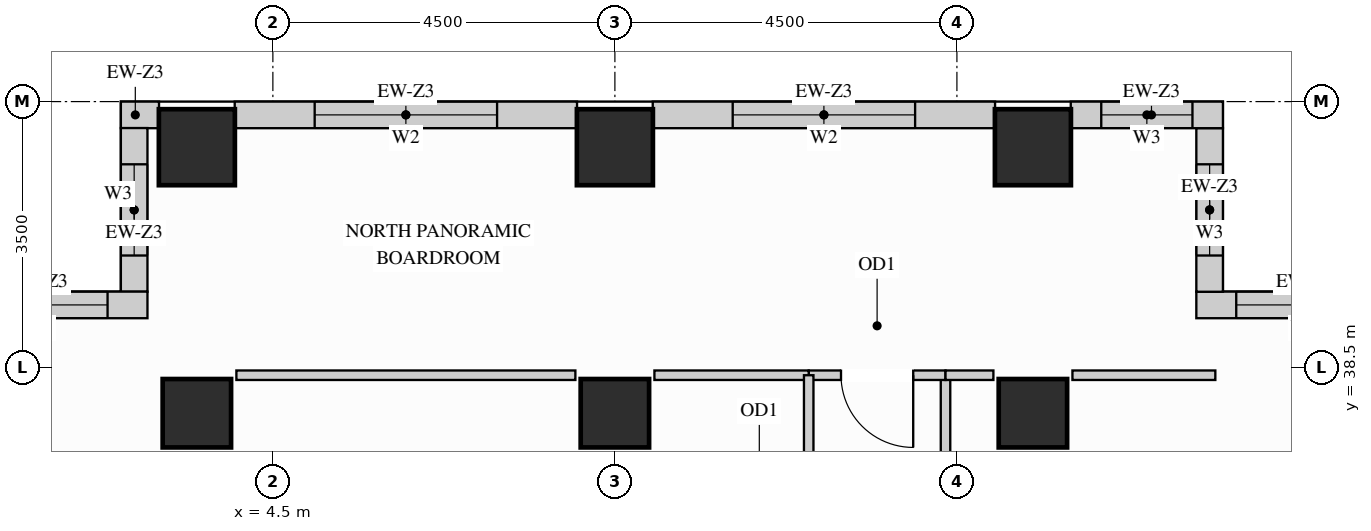
"""IFC4 building model, lengths in metres.
Left out: names, types, materials, properties, quantities, classifications, styles, units other than length and angle.
Written with IfcOpenShell. Run it as: python <this file> out.ifc"""

import sys

from ifc_helpers import new_model, si_unit, direction, frame, frame_2d, origin, origin_2d, place, context, subcontext, project, spatial, rectangle, extrude, source, transform, mapped, element, fill, save


model = new_model("IFC4")
c1 = context("Model", 3, precision=1e-05, world=origin(), true_north=direction((0.0, 1.0)))
c2 = subcontext(c1, "Body", "Model", "MODEL_VIEW")
j1 = project(units=[si_unit("LENGTHUNIT", "METRE"), si_unit("PLANEANGLEUNIT", "RADIAN")], contexts=[c1])
p1 = place(None, origin())
s1 = spatial("IfcSite", under=j1, at=p1, CompositionType="ELEMENT")
p2 = place(p1, origin())
s2 = spatial("IfcBuilding", under=s1, at=p2, CompositionType="ELEMENT")
p3 = place(p2, frame((0.0, 0.0, 171.9)))
s3 = spatial("IfcBuildingStorey", under=s2, at=p3, CompositionType="ELEMENT", Elevation=171.9)
m1 = source(origin(), c2, "Body", "SweptSolid", [
    extrude(rectangle(XDim=0.9, YDim=0.9, at=origin_2d()), origin(), (0.0, 0.0, 1.0), 3.4),
])
for number, where, z_axis, x_axis in (
    (1, (14.5, 37.9, 0.0), (0.0, 0.0, 1.0), (1.0, 0.0, 0.0)),
    (2, (3.5, 37.9, 0.0), (0.0, 0.0, 1.0), (1.0, 0.0, 0.0)),
    (3, (9.0, 37.9, 0.0), (0.0, 0.0, 1.0), (1.0, 0.0, 0.0)),
):
    element("IfcColumn", number, at=place(p3, frame(where, z_axis=z_axis, x_axis=x_axis)), inside=s3, PredefinedType="COLUMN", context=c2, shape_type="MappedRepresentation", body=[
        mapped(m1, transform((0.0, 0.0, 0.0), x_axis=(1.0, 0.0, 0.0), y_axis=(0.0, 1.0, 0.0), z_axis=(0.0, 0.0, 1.0))),
    ])
m2 = source(origin(), c2, "Body", "SweptSolid", [
    extrude(rectangle(XDim=1.0, YDim=1.0, at=origin_2d()), origin(), (0.0, 0.0, 1.0), 3.4),
])
for number, where, z_axis, x_axis in (
    (4, (14.5, 41.4, 0.0), (0.0, 0.0, 1.0), (1.0, 0.0, 0.0)),
    (5, (3.5, 41.4, 0.0), (0.0, 0.0, 1.0), (1.0, 0.0, 0.0)),
    (6, (9.0, 41.4, 0.0), (0.0, 0.0, 1.0), (1.0, 0.0, 0.0)),
):
    element("IfcColumn", number, at=place(p3, frame(where, z_axis=z_axis, x_axis=x_axis)), inside=s3, PredefinedType="COLUMN", context=c2, shape_type="MappedRepresentation", body=[
        mapped(m2, transform((0.0, 0.0, 0.0), x_axis=(1.0, 0.0, 0.0), y_axis=(0.0, 1.0, 0.0), z_axis=(0.0, 0.0, 1.0))),
    ])
p4 = place(p3, frame((19.5, 39.325, 0.0), z_axis=(0.0, 0.0, 1.0), x_axis=(-1.0, 0.0, 0.0)))
e7 = element("IfcWall", 7, at=p4, inside=s3, PredefinedType="SOLIDWALL", context=c2, shape_type="SweptSolid", body=[
    extrude(rectangle(XDim=2.85, YDim=0.35, at=frame_2d((1.425, 0.0))), origin(), (0.0, 0.0, 1.0), 3.385),
])
p5 = place(p4, frame((0.525, 0.0, 0.78)))
e8 = element("IfcOpeningElement", 8, at=p5, cuts=e7, PredefinedType="OPENING", context=c2, shape_type="SweptSolid", body=[
    extrude(rectangle(XDim=1.8, YDim=2.1, at=frame_2d((0.9, 1.05))), frame((0.0, 0.185, 0.0), z_axis=(0.0, -1.0, 0.0), x_axis=(1.0, 0.0, 0.0)), (0.0, 0.0, 1.0), 0.37),
])
p6 = place(p3, frame((16.825, 39.498, 0.0), z_axis=(0.0, 0.0, 1.0), x_axis=(0.0, 1.0, 0.0)))
e9 = element("IfcWall", 9, at=p6, inside=s3, PredefinedType="SOLIDWALL", context=c2, shape_type="SweptSolid", body=[
    extrude(rectangle(XDim=2.154, YDim=0.35, at=frame_2d((1.077, 0.0))), origin(), (0.0, 0.0, 1.0), 3.385),
])
p7 = place(p6, frame((0.477, 0.0, 0.78)))
e10 = element("IfcOpeningElement", 10, at=p7, cuts=e9, PredefinedType="OPENING", context=c2, shape_type="SweptSolid", body=[
    extrude(rectangle(XDim=1.2, YDim=2.1, at=frame_2d((0.6, 1.05))), frame((0.0, 0.185, 0.0), z_axis=(0.0, -1.0, 0.0), x_axis=(1.0, 0.0, 0.0)), (0.0, 0.0, 1.0), 0.37),
])
p8 = place(p3, frame((17.0, 41.825, 0.0), z_axis=(0.0, 0.0, 1.0), x_axis=(-1.0, 0.0, 0.0)))
e11 = element("IfcWall", 11, at=p8, inside=s3, PredefinedType="SOLIDWALL", context=c2, shape_type="SweptSolid", body=[
    extrude(rectangle(XDim=2.002, YDim=0.35, at=frame_2d((1.001, 0.0))), origin(), (0.0, 0.0, 1.0), 3.385),
])
p9 = place(p8, frame((0.401, 0.0, 0.78)))
e12 = element("IfcOpeningElement", 12, at=p9, cuts=e11, PredefinedType="OPENING", context=c2, shape_type="SweptSolid", body=[
    extrude(rectangle(XDim=1.2, YDim=2.1, at=frame_2d((0.6, 1.05))), frame((0.0, 0.185, 0.0), z_axis=(0.0, -1.0, 0.0), x_axis=(1.0, 0.0, 0.0)), (0.0, 0.0, 1.0), 0.37),
])
p10 = place(p3, frame((14.002, 41.825, 0.0), z_axis=(0.0, 0.0, 1.0), x_axis=(-1.0, 0.0, 0.0)))
e13 = element("IfcWall", 13, at=p10, inside=s3, PredefinedType="SOLIDWALL", context=c2, shape_type="SweptSolid", body=[
    extrude(rectangle(XDim=4.504, YDim=0.35, at=frame_2d((2.252, 0.0))), origin(), (0.0, 0.0, 1.0), 2.612),
])
p11 = place(p10, frame((1.052, 0.0, 0.78)))
e14 = element("IfcOpeningElement", 14, at=p11, cuts=e13, PredefinedType="OPENING", context=c2, shape_type="SweptSolid", body=[
    extrude(rectangle(XDim=2.4, YDim=1.652, at=frame_2d((1.2, 0.826))), frame((0.0, 0.185, 0.0), z_axis=(0.0, -1.0, 0.0), x_axis=(1.0, 0.0, 0.0)), (0.0, 0.0, 1.0), 0.37),
])
p12 = place(p3, frame((8.502, 41.825, 0.0), z_axis=(0.0, 0.0, 1.0), x_axis=(-1.0, 0.0, 0.0)))
e15 = element("IfcWall", 15, at=p12, inside=s3, PredefinedType="SOLIDWALL", context=c2, shape_type="SweptSolid", body=[
    extrude(rectangle(XDim=4.504, YDim=0.35, at=frame_2d((2.252, 0.0))), origin(), (0.0, 0.0, 1.0), 2.612),
])
p13 = place(p12, frame((1.052, 0.0, 0.78)))
e16 = element("IfcOpeningElement", 16, at=p13, cuts=e15, PredefinedType="OPENING", context=c2, shape_type="SweptSolid", body=[
    extrude(rectangle(XDim=2.4, YDim=1.652, at=frame_2d((1.2, 0.826))), frame((0.0, 0.185, 0.0), z_axis=(0.0, -1.0, 0.0), x_axis=(1.0, 0.0, 0.0)), (0.0, 0.0, 1.0), 0.37),
])
m3 = source(origin(), c2, "Body", "SweptSolid", [
    extrude(rectangle(XDim=0.502, YDim=0.35, at=frame_2d((0.251, 0.0))), origin(), (0.0, 0.0, 1.0), 3.385),
])
p14 = place(p3, frame((3.002, 41.825, 0.0), z_axis=(0.0, 0.0, 1.0), x_axis=(-1.0, 0.0, 0.0)))
e17 = element("IfcWall", 17, at=p14, inside=s3, PredefinedType="SOLIDWALL", context=c2, shape_type="MappedRepresentation", body=[
    mapped(m3, transform((0.0, 0.0, 0.0), x_axis=(1.0, 0.0, 0.0), y_axis=(0.0, 1.0, 0.0), z_axis=(0.0, 0.0, 1.0))),
])
p15 = place(p3, frame((2.675, 41.652, 0.0), z_axis=(0.0, 0.0, 1.0), x_axis=(0.0, -1.0, 0.0)))
e18 = element("IfcWall", 18, at=p15, inside=s3, PredefinedType="SOLIDWALL", context=c2, shape_type="SweptSolid", body=[
    extrude(rectangle(XDim=2.154, YDim=0.35, at=frame_2d((1.077, 0.0))), origin(), (0.0, 0.0, 1.0), 3.385),
])
p16 = place(p15, frame((0.477, 0.0, 0.78)))
e19 = element("IfcOpeningElement", 19, at=p16, cuts=e18, PredefinedType="OPENING", context=c2, shape_type="SweptSolid", body=[
    extrude(rectangle(XDim=1.2, YDim=2.1, at=frame_2d((0.6, 1.05))), frame((0.0, 0.185, 0.0), z_axis=(0.0, -1.0, 0.0), x_axis=(1.0, 0.0, 0.0)), (0.0, 0.0, 1.0), 0.37),
])
p17 = place(p3, frame((2.85, 39.325, 0.0), z_axis=(0.0, 0.0, 1.0), x_axis=(-1.0, 0.0, 0.0)))
e20 = element("IfcWall", 20, at=p17, inside=s3, PredefinedType="SOLIDWALL", context=c2, shape_type="SweptSolid", body=[
    extrude(rectangle(XDim=2.85, YDim=0.35, at=frame_2d((1.425, 0.0))), origin(), (0.0, 0.0, 1.0), 3.385),
])
p18 = place(p17, frame((0.525, 0.0, 0.78)))
e21 = element("IfcOpeningElement", 21, at=p18, cuts=e20, PredefinedType="OPENING", context=c2, shape_type="SweptSolid", body=[
    extrude(rectangle(XDim=1.8, YDim=2.1, at=frame_2d((0.9, 1.05))), frame((0.0, 0.185, 0.0), z_axis=(0.0, -1.0, 0.0), x_axis=(1.0, 0.0, 0.0)), (0.0, 0.0, 1.0), 0.37),
])
p19 = place(p3, frame((13.35, 32.35, 0.0), z_axis=(0.0, 0.0, 1.0), x_axis=(0.0, 1.0, 0.0)))
e22 = element("IfcWall", 22, at=p19, inside=s3, PredefinedType="PARTITIONING", context=c2, shape_type="SweptSolid", body=[
    extrude(rectangle(XDim=6.05, YDim=0.125, at=frame_2d((3.025, 0.0))), origin(), (0.0, 0.0, 1.0), 3.385),
])
p20 = place(p19, frame((2.55, 0.0, 0.0)))
e23 = element("IfcOpeningElement", 23, at=p20, cuts=e22, PredefinedType="OPENING", context=c2, shape_type="SweptSolid", body=[
    extrude(rectangle(XDim=0.95, YDim=2.15, at=frame_2d((0.475, 1.075))), frame((0.0, 0.073, 0.0), z_axis=(0.0, -1.0, 0.0), x_axis=(1.0, 0.0, 0.0)), (0.0, 0.0, 1.0), 0.145),
])
p21 = place(p3, frame((11.55, 38.4, 0.0), z_axis=(0.0, 0.0, 1.0), x_axis=(1.0, 0.0, 0.0)))
e24 = element("IfcWall", 24, at=p21, inside=s3, PredefinedType="PARTITIONING", context=c2, shape_type="SweptSolid", body=[
    extrude(rectangle(XDim=1.8, YDim=0.125, at=frame_2d((0.9, 0.0))), origin(), (0.0, 0.0, 1.0), 3.385),
])
p22 = place(p21, frame((0.425, 0.0, 0.0)))
e25 = element("IfcOpeningElement", 25, at=p22, cuts=e24, PredefinedType="OPENING", context=c2, shape_type="SweptSolid", body=[
    extrude(rectangle(XDim=0.95, YDim=2.15, at=frame_2d((0.475, 1.075))), frame((0.0, 0.073, 0.0), z_axis=(0.0, -1.0, 0.0), x_axis=(1.0, 0.0, 0.0)), (0.0, 0.0, 1.0), 0.145),
])
m4 = source(origin(), c2, "Body", "SweptSolid", [
    extrude(rectangle(XDim=0.63, YDim=0.125, at=frame_2d((0.315, 0.0))), origin(), (0.0, 0.0, 1.0), 3.385),
])
p23 = place(p3, frame((13.35, 38.4, 0.0), z_axis=(0.0, 0.0, 1.0), x_axis=(1.0, 0.0, 0.0)))
e26 = element("IfcWall", 26, at=p23, inside=s3, PredefinedType="PARTITIONING", context=c2, shape_type="MappedRepresentation", body=[
    mapped(m4, transform((0.0, 0.0, 0.0), x_axis=(1.0, 0.0, 0.0), y_axis=(0.0, 1.0, 0.0), z_axis=(0.0, 0.0, 1.0))),
])
m5 = source(origin(), c2, "Body", "SweptSolid", [
    extrude(rectangle(XDim=1.88, YDim=0.125, at=frame_2d((0.94, 0.0))), origin(), (0.0, 0.0, 1.0), 3.385),
])
p24 = place(p3, frame((15.02, 38.4, 0.0), z_axis=(0.0, 0.0, 1.0), x_axis=(1.0, 0.0, 0.0)))
e27 = element("IfcWall", 27, at=p24, inside=s3, PredefinedType="PARTITIONING", context=c2, shape_type="MappedRepresentation", body=[
    mapped(m5, transform((0.0, 0.0, 0.0), x_axis=(1.0, 0.0, 0.0), y_axis=(0.0, 1.0, 0.0), z_axis=(0.0, 0.0, 1.0))),
])
m6 = source(origin(), c2, "Body", "SweptSolid", [
    extrude(rectangle(XDim=4.46, YDim=0.125, at=frame_2d((2.23, 0.0))), origin(), (0.0, 0.0, 1.0), 3.385),
])
p25 = place(p3, frame((4.02, 38.4, 0.0), z_axis=(0.0, 0.0, 1.0), x_axis=(1.0, 0.0, 0.0)))
e28 = element("IfcWall", 28, at=p25, inside=s3, PredefinedType="PARTITIONING", context=c2, shape_type="MappedRepresentation", body=[
    mapped(m6, transform((0.0, 0.0, 0.0), x_axis=(1.0, 0.0, 0.0), y_axis=(0.0, 1.0, 0.0), z_axis=(0.0, 0.0, 1.0))),
])
m7 = source(origin(), c2, "Body", "SweptSolid", [
    extrude(rectangle(XDim=2.03, YDim=0.125, at=frame_2d((1.015, 0.0))), origin(), (0.0, 0.0, 1.0), 3.385),
])
p26 = place(p3, frame((9.52, 38.4, 0.0), z_axis=(0.0, 0.0, 1.0), x_axis=(1.0, 0.0, 0.0)))
e29 = element("IfcWall", 29, at=p26, inside=s3, PredefinedType="PARTITIONING", context=c2, shape_type="MappedRepresentation", body=[
    mapped(m7, transform((0.0, 0.0, 0.0), x_axis=(1.0, 0.0, 0.0), y_axis=(0.0, 1.0, 0.0), z_axis=(0.0, 0.0, 1.0))),
])
p27 = place(p3, frame((11.55, 35.254, 0.0), z_axis=(0.0, 0.0, 1.0), x_axis=(0.0, 1.0, 0.0)))
e30 = element("IfcWall", 30, at=p27, inside=s3, PredefinedType="PARTITIONING", context=c2, shape_type="SweptSolid", body=[
    extrude(rectangle(XDim=3.146, YDim=0.125, at=frame_2d((1.573, 0.0))), origin(), (0.0, 0.0, 1.0), 3.385),
])
p28 = place(p27, frame((1.098, 0.0, 0.0)))
e31 = element("IfcOpeningElement", 31, at=p28, cuts=e30, PredefinedType="OPENING", context=c2, shape_type="SweptSolid", body=[
    extrude(rectangle(XDim=0.95, YDim=2.15, at=frame_2d((0.475, 1.075))), frame((0.0, 0.073, 0.0), z_axis=(0.0, -1.0, 0.0), x_axis=(1.0, 0.0, 0.0)), (0.0, 0.0, 1.0), 0.145),
])
m8 = source(origin(), c2, "Body", "SweptSolid", [
    extrude(rectangle(XDim=0.95, YDim=2.15, at=frame_2d((0.475, 1.075))), frame((0.0, 0.025, 0.0), z_axis=(0.0, -1.0, 0.0), x_axis=(1.0, 0.0, 0.0)), (0.0, 0.0, 1.0), 0.05),
])
p29 = place(p22, origin())
e32 = element("IfcDoor", 32, at=p29, inside=s3, OperationType="SINGLE_SWING_RIGHT", PredefinedType="DOOR", context=c2, shape_type="MappedRepresentation", body=[
    mapped(m8, transform((0.0, 0.0, 0.0), x_axis=(1.0, 0.0, 0.0), y_axis=(0.0, 1.0, 0.0), z_axis=(0.0, 0.0, 1.0))),
])
fill(e25, e32)
m9 = source(origin(), c2, "Body", "SweptSolid", [
    extrude(rectangle(XDim=1.8, YDim=2.1, at=frame_2d((0.9, 1.05))), frame((0.0, 0.03, 0.0), z_axis=(0.0, -1.0, 0.0), x_axis=(1.0, 0.0, 0.0)), (0.0, 0.0, 1.0), 0.06),
])
p30 = place(p5, origin())
e33 = element("IfcWindow", 33, at=p30, inside=s3, PartitioningType="SINGLE_PANEL", PredefinedType="WINDOW", context=c2, shape_type="MappedRepresentation", body=[
    mapped(m9, transform((0.0, 0.0, 0.0), x_axis=(1.0, 0.0, 0.0), y_axis=(0.0, 1.0, 0.0), z_axis=(0.0, 0.0, 1.0))),
])
fill(e8, e33)
p31 = place(p18, origin())
e34 = element("IfcWindow", 34, at=p31, inside=s3, PartitioningType="SINGLE_PANEL", PredefinedType="WINDOW", context=c2, shape_type="MappedRepresentation", body=[
    mapped(m9, transform((0.0, 0.0, 0.0), x_axis=(1.0, 0.0, 0.0), y_axis=(0.0, 1.0, 0.0), z_axis=(0.0, 0.0, 1.0))),
])
fill(e21, e34)
m10 = source(origin(), c2, "Body", "SweptSolid", [
    extrude(rectangle(XDim=2.4, YDim=1.652, at=frame_2d((1.2, 0.826))), frame((0.0, 0.03, 0.0), z_axis=(0.0, -1.0, 0.0), x_axis=(1.0, 0.0, 0.0)), (0.0, 0.0, 1.0), 0.06),
])
p32 = place(p11, origin())
e35 = element("IfcWindow", 35, at=p32, inside=s3, PartitioningType="SINGLE_PANEL", PredefinedType="WINDOW", context=c2, shape_type="MappedRepresentation", body=[
    mapped(m10, transform((0.0, 0.0, 0.0), x_axis=(1.0, 0.0, 0.0), y_axis=(0.0, 1.0, 0.0), z_axis=(0.0, 0.0, 1.0))),
])
fill(e14, e35)
p33 = place(p13, origin())
e36 = element("IfcWindow", 36, at=p33, inside=s3, PartitioningType="SINGLE_PANEL", PredefinedType="WINDOW", context=c2, shape_type="MappedRepresentation", body=[
    mapped(m10, transform((0.0, 0.0, 0.0), x_axis=(1.0, 0.0, 0.0), y_axis=(0.0, 1.0, 0.0), z_axis=(0.0, 0.0, 1.0))),
])
fill(e16, e36)
m11 = source(origin(), c2, "Body", "SweptSolid", [
    extrude(rectangle(XDim=1.2, YDim=2.1, at=frame_2d((0.6, 1.05))), frame((0.0, 0.03, 0.0), z_axis=(0.0, -1.0, 0.0), x_axis=(1.0, 0.0, 0.0)), (0.0, 0.0, 1.0), 0.06),
])
p34 = place(p7, origin())
e37 = element("IfcWindow", 37, at=p34, inside=s3, PartitioningType="SINGLE_PANEL", PredefinedType="WINDOW", context=c2, shape_type="MappedRepresentation", body=[
    mapped(m11, transform((0.0, 0.0, 0.0), x_axis=(1.0, 0.0, 0.0), y_axis=(0.0, 1.0, 0.0), z_axis=(0.0, 0.0, 1.0))),
])
fill(e10, e37)
p35 = place(p9, origin())
e38 = element("IfcWindow", 38, at=p35, inside=s3, PartitioningType="SINGLE_PANEL", PredefinedType="WINDOW", context=c2, shape_type="MappedRepresentation", body=[
    mapped(m11, transform((0.0, 0.0, 0.0), x_axis=(1.0, 0.0, 0.0), y_axis=(0.0, 1.0, 0.0), z_axis=(0.0, 0.0, 1.0))),
])
fill(e12, e38)
p36 = place(p16, origin())
e39 = element("IfcWindow", 39, at=p36, inside=s3, PartitioningType="SINGLE_PANEL", PredefinedType="WINDOW", context=c2, shape_type="MappedRepresentation", body=[
    mapped(m11, transform((0.0, 0.0, 0.0), x_axis=(1.0, 0.0, 0.0), y_axis=(0.0, 1.0, 0.0), z_axis=(0.0, 0.0, 1.0))),
])
fill(e19, e39)
save(model, sys.argv[1])
